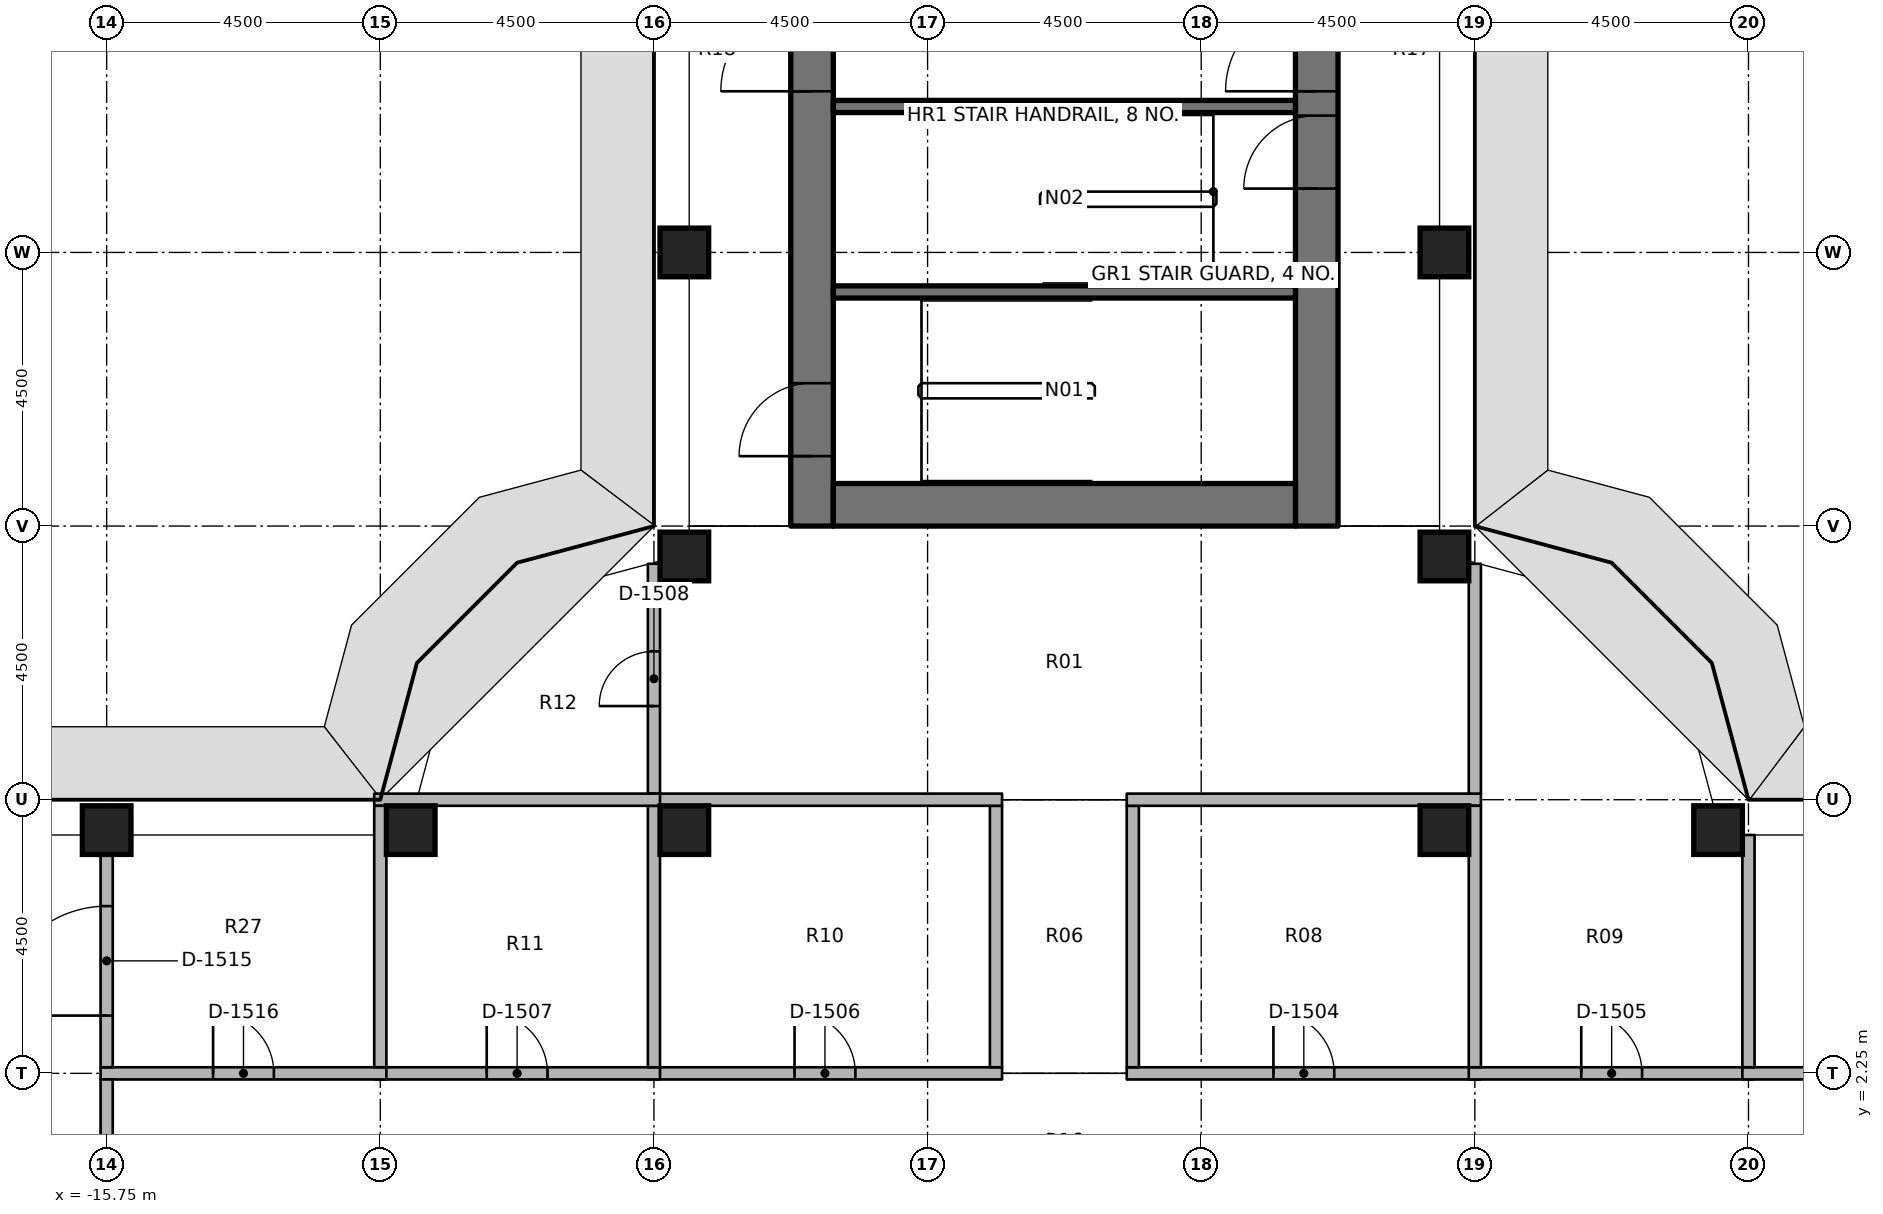
"""IFC4 building model, lengths in metres.
Left out: names, types, materials, properties, quantities, classifications, styles, units other than length and angle.
Written with IfcOpenShell. Run it as: python <this file> out.ifc"""

import sys

from ifc_helpers import new_model, si_unit, direction, frame, frame_2d, origin, origin_2d, place, context, subcontext, project, spatial, rectangle, extrude, element, fill, save


model = new_model("IFC4")
c1 = context("Model", 3, precision=1e-05, world=origin(), true_north=direction((0.0, 1.0)))
c2 = subcontext(c1, "Body", "Model", "MODEL_VIEW")
j1 = project(units=[si_unit("LENGTHUNIT", "METRE"), si_unit("PLANEANGLEUNIT", "RADIAN")], contexts=[c1])
p1 = place(None, origin())
s1 = spatial("IfcSite", under=j1, at=p1, CompositionType="ELEMENT")
p2 = place(p1, origin())
s2 = spatial("IfcBuilding", under=s1, at=p2, CompositionType="ELEMENT")
p3 = place(p2, frame((0.0, 0.0, 144.8)))
s3 = spatial("IfcBuildingStorey", under=s2, at=p3, CompositionType="ELEMENT", Elevation=144.8)
for number, where, z_axis, x_axis in (
    (1, (-15.75, 6.25, 0.0), (0.0, 0.0, 1.0), (1.0, 0.0, 0.0)),
    (2, (-10.75, 6.25, 0.0), (0.0, 0.0, 1.0), (1.0, 0.0, 0.0)),
    (3, (-6.25, 6.25, 0.0), (0.0, 0.0, 1.0), (1.0, 0.0, 0.0)),
    (4, (-6.25, 10.75, 0.0), (0.0, 0.0, 1.0), (1.0, 0.0, 0.0)),
    (5, (-6.25, 15.75, 0.0), (0.0, 0.0, 1.0), (1.0, 0.0, 0.0)),
    (6, (6.25, 6.25, 0.0), (0.0, 0.0, 1.0), (1.0, 0.0, 0.0)),
    (7, (6.25, 10.75, 0.0), (0.0, 0.0, 1.0), (1.0, 0.0, 0.0)),
    (8, (6.25, 15.75, 0.0), (0.0, 0.0, 1.0), (1.0, 0.0, 0.0)),
    (9, (10.75, 6.25, 0.0), (0.0, 0.0, 1.0), (1.0, 0.0, 0.0)),
):
    element("IfcColumn", number, at=place(p3, frame(where, z_axis=z_axis, x_axis=x_axis)), inside=s3, PredefinedType="COLUMN", context=c2, shape_type="SweptSolid", body=[
        extrude(rectangle(XDim=0.8, YDim=0.8, at=origin_2d()), origin(), (0.0, 0.0, 1.0), 3.65),
    ])
p4 = place(p3, frame((-4.15, 11.25, 0.0), z_axis=(0.0, 0.0, 1.0), x_axis=(0.0, 1.0, 0.0)))
e10 = element("IfcWall", 10, at=p4, inside=s3, PredefinedType="SHEAR", context=c2, shape_type="SweptSolid", body=[
    extrude(rectangle(XDim=15.0, YDim=0.7, at=frame_2d((7.5, 0.0))), origin(), (0.0, 0.0, 1.0), 3.8),
])
p5 = place(p4, frame((7.15, 0.0, 0.0)))
e11 = element("IfcOpeningElement", 11, at=p5, cuts=e10, PredefinedType="OPENING", context=c2, shape_type="SweptSolid", body=[
    extrude(rectangle(XDim=1.5, YDim=2.3, at=frame_2d((0.75, 1.15))), frame((0.0, 0.36, 0.0), z_axis=(0.0, -1.0, 0.0), x_axis=(1.0, 0.0, 0.0)), (0.0, 0.0, 1.0), 0.72),
])
p6 = place(p4, frame((13.9, 0.0, 0.0)))
e12 = element("IfcOpeningElement", 12, at=p6, cuts=e10, PredefinedType="OPENING", context=c2, shape_type="SweptSolid", body=[
    extrude(rectangle(XDim=0.9, YDim=2.1, at=frame_2d((0.45, 1.05))), frame((0.0, 0.36, 0.0), z_axis=(0.0, -1.0, 0.0), x_axis=(1.0, 0.0, 0.0)), (0.0, 0.0, 1.0), 0.72),
])
p7 = place(p4, frame((1.15, 0.0, 0.0)))
e13 = element("IfcOpeningElement", 13, at=p7, cuts=e10, PredefinedType="OPENING", context=c2, shape_type="SweptSolid", body=[
    extrude(rectangle(XDim=1.2, YDim=2.1, at=frame_2d((0.6, 1.05))), frame((0.0, 0.36, 0.0), z_axis=(0.0, -1.0, 0.0), x_axis=(1.0, 0.0, 0.0)), (0.0, 0.0, 1.0), 0.72),
])
p8 = place(p3, frame((4.15, 11.25, 0.0), z_axis=(0.0, 0.0, 1.0), x_axis=(0.0, 1.0, 0.0)))
e14 = element("IfcWall", 14, at=p8, inside=s3, PredefinedType="SHEAR", context=c2, shape_type="SweptSolid", body=[
    extrude(rectangle(XDim=15.0, YDim=0.7, at=frame_2d((7.5, 0.0))), origin(), (0.0, 0.0, 1.0), 3.8),
])
p9 = place(p8, frame((7.15, 0.0, 0.0)))
e15 = element("IfcOpeningElement", 15, at=p9, cuts=e14, PredefinedType="OPENING", context=c2, shape_type="SweptSolid", body=[
    extrude(rectangle(XDim=1.5, YDim=2.3, at=frame_2d((0.75, 1.15))), frame((0.0, 0.36, 0.0), z_axis=(0.0, -1.0, 0.0), x_axis=(1.0, 0.0, 0.0)), (0.0, 0.0, 1.0), 0.72),
])
p10 = place(p8, frame((5.55, 0.0, 0.0)))
e16 = element("IfcOpeningElement", 16, at=p10, cuts=e14, PredefinedType="OPENING", context=c2, shape_type="SweptSolid", body=[
    extrude(rectangle(XDim=1.2, YDim=2.1, at=frame_2d((0.6, 1.05))), frame((0.0, 0.36, 0.0), z_axis=(0.0, -1.0, 0.0), x_axis=(1.0, 0.0, 0.0)), (0.0, 0.0, 1.0), 0.72),
])
p11 = place(p3, frame((-3.8, 11.6, 0.0), z_axis=(0.0, 0.0, 1.0), x_axis=(1.0, 0.0, 0.0)))
e17 = element("IfcWall", 17, at=p11, inside=s3, PredefinedType="SHEAR", context=c2, shape_type="SweptSolid", body=[
    extrude(rectangle(XDim=7.6, YDim=0.7, at=frame_2d((3.8, 0.0))), origin(), (0.0, 0.0, 1.0), 3.8),
])
for number, where, z_axis, x_axis in (
    (18, (-3.8, 18.15, 0.0), (0.0, 0.0, 1.0), (1.0, 0.0, 0.0)),
    (19, (-3.8, 15.1, 0.0), (0.0, 0.0, 1.0), (1.0, 0.0, 0.0)),
):
    element("IfcWall", number, at=place(p3, frame(where, z_axis=z_axis, x_axis=x_axis)), inside=s3, PredefinedType="SHEAR", context=c2, shape_type="SweptSolid", body=[
        extrude(rectangle(XDim=7.6, YDim=0.2, at=frame_2d((3.8, 0.0))), origin(), (0.0, 0.0, 1.0), 3.65),
    ])
p12 = place(p3, frame((1.025, 2.25, 0.0), z_axis=(0.0, 0.0, 1.0), x_axis=(1.0, 0.0, 0.0)))
e20 = element("IfcWall", 20, at=p12, inside=s3, PredefinedType="PARTITIONING", context=c2, shape_type="SweptSolid", body=[
    extrude(rectangle(XDim=5.825, YDim=0.2, at=frame_2d((2.913, 0.0))), origin(), (0.0, 0.0, 1.0), 2.75),
])
p13 = place(p12, frame((2.413, 0.0, 0.0)))
e21 = element("IfcOpeningElement", 21, at=p13, cuts=e20, PredefinedType="OPENING", context=c2, shape_type="SweptSolid", body=[
    extrude(rectangle(XDim=1.0, YDim=2.1, at=frame_2d((0.5, 1.05))), frame((0.0, 0.11, 0.0), z_axis=(0.0, -1.0, 0.0), x_axis=(1.0, 0.0, 0.0)), (0.0, 0.0, 1.0), 0.22),
])
p14 = place(p3, frame((6.65, 2.25, 0.0), z_axis=(0.0, 0.0, 1.0), x_axis=(1.0, 0.0, 0.0)))
e22 = element("IfcWall", 22, at=p14, inside=s3, PredefinedType="PARTITIONING", context=c2, shape_type="SweptSolid", body=[
    extrude(rectangle(XDim=4.7, YDim=0.2, at=frame_2d((2.35, 0.0))), origin(), (0.0, 0.0, 1.0), 2.75),
])
p15 = place(p14, frame((1.85, 0.0, 0.0)))
e23 = element("IfcOpeningElement", 23, at=p15, cuts=e22, PredefinedType="OPENING", context=c2, shape_type="SweptSolid", body=[
    extrude(rectangle(XDim=1.0, YDim=2.1, at=frame_2d((0.5, 1.05))), frame((0.0, 0.11, 0.0), z_axis=(0.0, -1.0, 0.0), x_axis=(1.0, 0.0, 0.0)), (0.0, 0.0, 1.0), 0.22),
])
p16 = place(p3, frame((-6.85, 2.25, 0.0), z_axis=(0.0, 0.0, 1.0), x_axis=(1.0, 0.0, 0.0)))
e24 = element("IfcWall", 24, at=p16, inside=s3, PredefinedType="PARTITIONING", context=c2, shape_type="SweptSolid", body=[
    extrude(rectangle(XDim=5.825, YDim=0.2, at=frame_2d((2.913, 0.0))), origin(), (0.0, 0.0, 1.0), 2.75),
])
p17 = place(p16, frame((2.413, 0.0, 0.0)))
e25 = element("IfcOpeningElement", 25, at=p17, cuts=e24, PredefinedType="OPENING", context=c2, shape_type="SweptSolid", body=[
    extrude(rectangle(XDim=1.0, YDim=2.1, at=frame_2d((0.5, 1.05))), frame((0.0, 0.11, 0.0), z_axis=(0.0, -1.0, 0.0), x_axis=(1.0, 0.0, 0.0)), (0.0, 0.0, 1.0), 0.22),
])
p18 = place(p3, frame((-11.35, 2.25, 0.0), z_axis=(0.0, 0.0, 1.0), x_axis=(1.0, 0.0, 0.0)))
e26 = element("IfcWall", 26, at=p18, inside=s3, PredefinedType="PARTITIONING", context=c2, shape_type="SweptSolid", body=[
    extrude(rectangle(XDim=4.7, YDim=0.2, at=frame_2d((2.35, 0.0))), origin(), (0.0, 0.0, 1.0), 2.75),
])
p19 = place(p18, frame((1.85, 0.0, 0.0)))
e27 = element("IfcOpeningElement", 27, at=p19, cuts=e26, PredefinedType="OPENING", context=c2, shape_type="SweptSolid", body=[
    extrude(rectangle(XDim=1.0, YDim=2.1, at=frame_2d((0.5, 1.05))), frame((0.0, 0.11, 0.0), z_axis=(0.0, -1.0, 0.0), x_axis=(1.0, 0.0, 0.0)), (0.0, 0.0, 1.0), 0.22),
])
p20 = place(p3, frame((11.15, 2.25, 0.0), z_axis=(0.0, 0.0, 1.0), x_axis=(1.0, 0.0, 0.0)))
e28 = element("IfcWall", 28, at=p20, inside=s3, PredefinedType="PARTITIONING", context=c2, shape_type="SweptSolid", body=[
    extrude(rectangle(XDim=4.7, YDim=0.2, at=frame_2d((2.35, 0.0))), origin(), (0.0, 0.0, 1.0), 2.75),
])
p21 = place(p20, frame((1.85, 0.0, 0.0)))
e29 = element("IfcOpeningElement", 29, at=p21, cuts=e28, PredefinedType="OPENING", context=c2, shape_type="SweptSolid", body=[
    extrude(rectangle(XDim=1.0, YDim=2.1, at=frame_2d((0.5, 1.05))), frame((0.0, 0.11, 0.0), z_axis=(0.0, -1.0, 0.0), x_axis=(1.0, 0.0, 0.0)), (0.0, 0.0, 1.0), 0.22),
])
p22 = place(p3, frame((-15.85, 2.25, 0.0), z_axis=(0.0, 0.0, 1.0), x_axis=(1.0, 0.0, 0.0)))
e30 = element("IfcWall", 30, at=p22, inside=s3, PredefinedType="PARTITIONING", context=c2, shape_type="SweptSolid", body=[
    extrude(rectangle(XDim=4.7, YDim=0.2, at=frame_2d((2.35, 0.0))), origin(), (0.0, 0.0, 1.0), 2.75),
])
p23 = place(p22, frame((1.85, 0.0, 0.0)))
e31 = element("IfcOpeningElement", 31, at=p23, cuts=e30, PredefinedType="OPENING", context=c2, shape_type="SweptSolid", body=[
    extrude(rectangle(XDim=1.0, YDim=2.1, at=frame_2d((0.5, 1.05))), frame((0.0, 0.11, 0.0), z_axis=(0.0, -1.0, 0.0), x_axis=(1.0, 0.0, 0.0)), (0.0, 0.0, 1.0), 0.22),
])
p24 = place(p3, frame((-15.75, 0.1, 0.0), z_axis=(0.0, 0.0, 1.0), x_axis=(0.0, 1.0, 0.0)))
e32 = element("IfcWall", 32, at=p24, inside=s3, PredefinedType="PARTITIONING", context=c2, shape_type="SweptSolid", body=[
    extrude(rectangle(XDim=2.05, YDim=0.2, at=frame_2d((1.025, 0.0))), origin(), (0.0, 0.0, 1.0), 2.75),
])
for number, where, z_axis, x_axis in (
    (33, (1.125, 2.35, 0.0), (0.0, 0.0, 1.0), (0.0, 1.0, 0.0)),
    (34, (-1.125, 2.35, 0.0), (0.0, 0.0, 1.0), (0.0, 1.0, 0.0)),
):
    element("IfcWall", number, at=place(p3, frame(where, z_axis=z_axis, x_axis=x_axis)), inside=s3, PredefinedType="PARTITIONING", context=c2, shape_type="SweptSolid", body=[
        extrude(rectangle(XDim=4.3, YDim=0.2, at=frame_2d((2.15, 0.0))), origin(), (0.0, 0.0, 1.0), 2.75),
    ])
p25 = place(p3, frame((1.025, 6.75, 0.0), z_axis=(0.0, 0.0, 1.0), x_axis=(1.0, 0.0, 0.0)))
e35 = element("IfcWall", 35, at=p25, inside=s3, PredefinedType="PARTITIONING", context=c2, shape_type="SweptSolid", body=[
    extrude(rectangle(XDim=5.825, YDim=0.2, at=frame_2d((2.913, 0.0))), origin(), (0.0, 0.0, 1.0), 2.75),
])
p26 = place(p3, frame((6.75, 6.85, 0.0), z_axis=(0.0, 0.0, 1.0), x_axis=(0.0, 1.0, 0.0)))
e36 = element("IfcWall", 36, at=p26, inside=s3, PredefinedType="PARTITIONING", context=c2, shape_type="SweptSolid", body=[
    extrude(rectangle(XDim=3.78, YDim=0.2, at=frame_2d((1.89, 0.0))), origin(), (0.0, 0.0, 1.0), 2.75),
])
p27 = place(p3, frame((-6.85, 6.75, 0.0), z_axis=(0.0, 0.0, 1.0), x_axis=(1.0, 0.0, 0.0)))
e37 = element("IfcWall", 37, at=p27, inside=s3, PredefinedType="PARTITIONING", context=c2, shape_type="SweptSolid", body=[
    extrude(rectangle(XDim=5.825, YDim=0.2, at=frame_2d((2.913, 0.0))), origin(), (0.0, 0.0, 1.0), 2.75),
])
p28 = place(p3, frame((-6.75, 6.85, 0.0), z_axis=(0.0, 0.0, 1.0), x_axis=(0.0, 1.0, 0.0)))
e38 = element("IfcWall", 38, at=p28, inside=s3, PredefinedType="PARTITIONING", context=c2, shape_type="SweptSolid", body=[
    extrude(rectangle(XDim=3.78, YDim=0.2, at=frame_2d((1.89, 0.0))), origin(), (0.0, 0.0, 1.0), 2.75),
])
p29 = place(p28, frame((1.44, 0.0, 0.0)))
e39 = element("IfcOpeningElement", 39, at=p29, cuts=e38, PredefinedType="OPENING", context=c2, shape_type="SweptSolid", body=[
    extrude(rectangle(XDim=0.9, YDim=2.1, at=frame_2d((0.45, 1.05))), frame((0.0, 0.11, 0.0), z_axis=(0.0, -1.0, 0.0), x_axis=(1.0, 0.0, 0.0)), (0.0, 0.0, 1.0), 0.22),
])
p30 = place(p3, frame((6.75, 2.35, 0.0), z_axis=(0.0, 0.0, 1.0), x_axis=(0.0, 1.0, 0.0)))
e40 = element("IfcWall", 40, at=p30, inside=s3, PredefinedType="PARTITIONING", context=c2, shape_type="SweptSolid", body=[
    extrude(rectangle(XDim=4.3, YDim=0.2, at=frame_2d((2.15, 0.0))), origin(), (0.0, 0.0, 1.0), 2.75),
])
p31 = place(p3, frame((11.25, 2.35, 0.0), z_axis=(0.0, 0.0, 1.0), x_axis=(0.0, 1.0, 0.0)))
e41 = element("IfcWall", 41, at=p31, inside=s3, PredefinedType="PARTITIONING", context=c2, shape_type="SweptSolid", body=[
    extrude(rectangle(XDim=3.82, YDim=0.2, at=frame_2d((1.91, 0.0))), origin(), (0.0, 0.0, 1.0), 2.75),
])
p32 = place(p3, frame((-6.75, 2.35, 0.0), z_axis=(0.0, 0.0, 1.0), x_axis=(0.0, 1.0, 0.0)))
e42 = element("IfcWall", 42, at=p32, inside=s3, PredefinedType="PARTITIONING", context=c2, shape_type="SweptSolid", body=[
    extrude(rectangle(XDim=4.3, YDim=0.2, at=frame_2d((2.15, 0.0))), origin(), (0.0, 0.0, 1.0), 2.75),
])
p33 = place(p3, frame((-11.35, 6.75, 0.0), z_axis=(0.0, 0.0, 1.0), x_axis=(1.0, 0.0, 0.0)))
e43 = element("IfcWall", 43, at=p33, inside=s3, PredefinedType="PARTITIONING", context=c2, shape_type="SweptSolid", body=[
    extrude(rectangle(XDim=4.7, YDim=0.2, at=frame_2d((2.35, 0.0))), origin(), (0.0, 0.0, 1.0), 2.75),
])
p34 = place(p3, frame((-11.25, 2.35, 0.0), z_axis=(0.0, 0.0, 1.0), x_axis=(0.0, 1.0, 0.0)))
e44 = element("IfcWall", 44, at=p34, inside=s3, PredefinedType="PARTITIONING", context=c2, shape_type="SweptSolid", body=[
    extrude(rectangle(XDim=4.3, YDim=0.2, at=frame_2d((2.15, 0.0))), origin(), (0.0, 0.0, 1.0), 2.75),
])
p35 = place(p3, frame((-15.75, 2.35, 0.0), z_axis=(0.0, 0.0, 1.0), x_axis=(0.0, 1.0, 0.0)))
e45 = element("IfcWall", 45, at=p35, inside=s3, PredefinedType="PARTITIONING", context=c2, shape_type="SweptSolid", body=[
    extrude(rectangle(XDim=3.5, YDim=0.2, at=frame_2d((1.75, 0.0))), origin(), (0.0, 0.0, 1.0), 2.75),
])
p36 = place(p35, frame((0.85, 0.0, 0.0)))
e46 = element("IfcOpeningElement", 46, at=p36, cuts=e45, PredefinedType="OPENING", context=c2, shape_type="SweptSolid", body=[
    extrude(rectangle(XDim=1.8, YDim=2.1, at=frame_2d((0.9, 1.05))), frame((0.0, 0.11, 0.0), z_axis=(0.0, -1.0, 0.0), x_axis=(1.0, 0.0, 0.0)), (0.0, 0.0, 1.0), 0.22),
])
p37 = place(p5, origin())
e47 = element("IfcDoor", 47, at=p37, inside=s3, OperationType="DOUBLE_DOOR_SINGLE_SWING", PredefinedType="DOOR", context=c2, shape_type="SweptSolid", body=[
    extrude(rectangle(XDim=1.5, YDim=2.3, at=frame_2d((0.75, 1.15))), frame((0.0, 0.025, 0.0), z_axis=(0.0, -1.0, 0.0), x_axis=(1.0, 0.0, 0.0)), (0.0, 0.0, 1.0), 0.05),
])
fill(e11, e47)
p38 = place(p9, origin())
e48 = element("IfcDoor", 48, at=p38, inside=s3, OperationType="DOUBLE_DOOR_SINGLE_SWING", PredefinedType="DOOR", context=c2, shape_type="SweptSolid", body=[
    extrude(rectangle(XDim=1.5, YDim=2.3, at=frame_2d((0.75, 1.15))), frame((0.0, 0.025, 0.0), z_axis=(0.0, -1.0, 0.0), x_axis=(1.0, 0.0, 0.0)), (0.0, 0.0, 1.0), 0.05),
])
fill(e15, e48)
p39 = place(p10, origin())
e49 = element("IfcDoor", 49, at=p39, inside=s3, OperationType="SINGLE_SWING_RIGHT", PredefinedType="DOOR", context=c2, shape_type="SweptSolid", body=[
    extrude(rectangle(XDim=1.2, YDim=2.1, at=frame_2d((0.6, 1.05))), frame((0.0, 0.025, 0.0), z_axis=(0.0, -1.0, 0.0), x_axis=(1.0, 0.0, 0.0)), (0.0, 0.0, 1.0), 0.05),
])
fill(e16, e49)
p40 = place(p7, origin())
e50 = element("IfcDoor", 50, at=p40, inside=s3, OperationType="SINGLE_SWING_LEFT", PredefinedType="DOOR", context=c2, shape_type="SweptSolid", body=[
    extrude(rectangle(XDim=1.2, YDim=2.1, at=frame_2d((0.6, 1.05))), frame((0.0, 0.025, 0.0), z_axis=(0.0, -1.0, 0.0), x_axis=(1.0, 0.0, 0.0)), (0.0, 0.0, 1.0), 0.05),
])
fill(e13, e50)
p41 = place(p13, origin())
e51 = element("IfcDoor", 51, at=p41, inside=s3, OperationType="SINGLE_SWING_RIGHT", PredefinedType="DOOR", context=c2, shape_type="SweptSolid", body=[
    extrude(rectangle(XDim=1.0, YDim=2.1, at=frame_2d((0.5, 1.05))), frame((0.0, 0.025, 0.0), z_axis=(0.0, -1.0, 0.0), x_axis=(1.0, 0.0, 0.0)), (0.0, 0.0, 1.0), 0.05),
])
fill(e21, e51)
p42 = place(p15, origin())
e52 = element("IfcDoor", 52, at=p42, inside=s3, OperationType="SINGLE_SWING_RIGHT", PredefinedType="DOOR", context=c2, shape_type="SweptSolid", body=[
    extrude(rectangle(XDim=1.0, YDim=2.1, at=frame_2d((0.5, 1.05))), frame((0.0, 0.025, 0.0), z_axis=(0.0, -1.0, 0.0), x_axis=(1.0, 0.0, 0.0)), (0.0, 0.0, 1.0), 0.05),
])
fill(e23, e52)
p43 = place(p17, origin())
e53 = element("IfcDoor", 53, at=p43, inside=s3, OperationType="SINGLE_SWING_RIGHT", PredefinedType="DOOR", context=c2, shape_type="SweptSolid", body=[
    extrude(rectangle(XDim=1.0, YDim=2.1, at=frame_2d((0.5, 1.05))), frame((0.0, 0.025, 0.0), z_axis=(0.0, -1.0, 0.0), x_axis=(1.0, 0.0, 0.0)), (0.0, 0.0, 1.0), 0.05),
])
fill(e25, e53)
p44 = place(p19, origin())
e54 = element("IfcDoor", 54, at=p44, inside=s3, OperationType="SINGLE_SWING_RIGHT", PredefinedType="DOOR", context=c2, shape_type="SweptSolid", body=[
    extrude(rectangle(XDim=1.0, YDim=2.1, at=frame_2d((0.5, 1.05))), frame((0.0, 0.025, 0.0), z_axis=(0.0, -1.0, 0.0), x_axis=(1.0, 0.0, 0.0)), (0.0, 0.0, 1.0), 0.05),
])
fill(e27, e54)
p45 = place(p29, origin())
e55 = element("IfcDoor", 55, at=p45, inside=s3, OperationType="SINGLE_SWING_LEFT", PredefinedType="DOOR", context=c2, shape_type="SweptSolid", body=[
    extrude(rectangle(XDim=0.9, YDim=2.1, at=frame_2d((0.45, 1.05))), frame((0.0, 0.025, 0.0), z_axis=(0.0, -1.0, 0.0), x_axis=(1.0, 0.0, 0.0)), (0.0, 0.0, 1.0), 0.05),
])
fill(e39, e55)
p46 = place(p36, origin())
e56 = element("IfcDoor", 56, at=p46, inside=s3, OperationType="DOUBLE_DOOR_SINGLE_SWING", PredefinedType="DOOR", context=c2, shape_type="SweptSolid", body=[
    extrude(rectangle(XDim=1.8, YDim=2.1, at=frame_2d((0.9, 1.05))), frame((0.0, 0.025, 0.0), z_axis=(0.0, -1.0, 0.0), x_axis=(1.0, 0.0, 0.0)), (0.0, 0.0, 1.0), 0.05),
])
fill(e46, e56)
p47 = place(p23, origin())
e57 = element("IfcDoor", 57, at=p47, inside=s3, OperationType="SINGLE_SWING_RIGHT", PredefinedType="DOOR", context=c2, shape_type="SweptSolid", body=[
    extrude(rectangle(XDim=1.0, YDim=2.1, at=frame_2d((0.5, 1.05))), frame((0.0, 0.025, 0.0), z_axis=(0.0, -1.0, 0.0), x_axis=(1.0, 0.0, 0.0)), (0.0, 0.0, 1.0), 0.05),
])
fill(e31, e57)
save(model, sys.argv[1])
